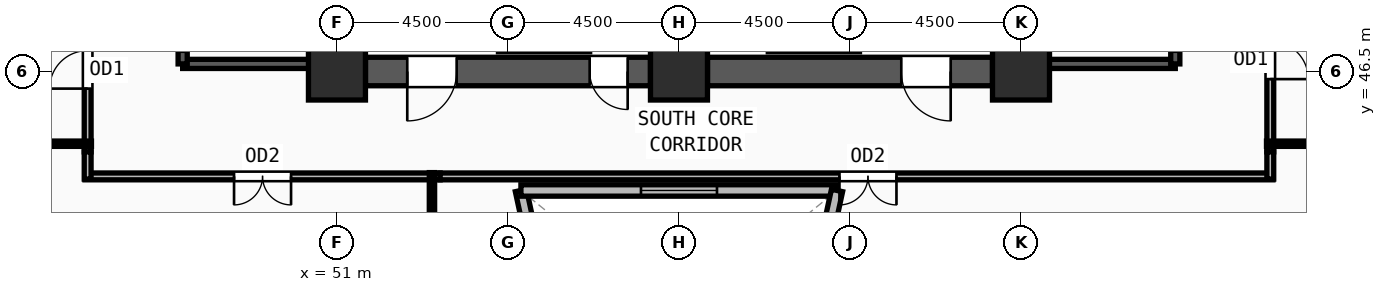
"""IFC4 building model, lengths in metres.
Left out: names, types, materials, properties, quantities, classifications, styles, units other than length and angle.
Written with IfcOpenShell. Run it as: python <this file> out.ifc"""

import sys

from ifc_helpers import new_model, si_unit, direction, frame, frame_2d, origin, origin_2d, place, context, subcontext, project, spatial, rectangle, extrude, source, transform, mapped, element, fill, save


model = new_model("IFC4")
c1 = context("Model", 3, precision=1e-05, world=origin(), true_north=direction((0.0, 1.0)))
c2 = subcontext(c1, "Body", "Model", "MODEL_VIEW")
j1 = project(units=[si_unit("LENGTHUNIT", "METRE"), si_unit("PLANEANGLEUNIT", "RADIAN")], contexts=[c1])
p1 = place(None, origin())
s1 = spatial("IfcSite", under=j1, at=p1, CompositionType="ELEMENT")
p2 = place(p1, origin())
s2 = spatial("IfcBuilding", under=s1, at=p2, CompositionType="ELEMENT")
p3 = place(p2, frame((0.0, 0.0, 102.0)))
s3 = spatial("IfcBuildingStorey", under=s2, at=p3, CompositionType="ELEMENT", Elevation=102.0)
m1 = source(origin(), c2, "Body", "SweptSolid", [
    extrude(rectangle(XDim=1.5, YDim=1.5, at=origin_2d()), origin(), (0.0, 0.0, 1.0), 3.75),
])
for number, where, z_axis, x_axis in (
    (1, (51.0, 46.5, 0.0), (0.0, 0.0, 1.0), (1.0, 0.0, 0.0)),
    (2, (60.0, 46.5, 0.0), (0.0, 0.0, 1.0), (1.0, 0.0, 0.0)),
    (3, (69.0, 46.5, 0.0), (0.0, 0.0, 1.0), (1.0, 0.0, 0.0)),
):
    element("IfcColumn", number, at=place(p3, frame(where, z_axis=z_axis, x_axis=x_axis)), inside=s3, PredefinedType="COLUMN", context=c2, shape_type="MappedRepresentation", body=[
        mapped(m1, transform((0.0, 0.0, 0.0), x_axis=(1.0, 0.0, 0.0), y_axis=(0.0, 1.0, 0.0), z_axis=(0.0, 0.0, 1.0), scale=1.0)),
    ])
p4 = place(p3, frame((68.25, 46.5, 0.0), z_axis=(0.0, 0.0, 1.0), x_axis=(-1.0, 0.0, 0.0)))
e4 = element("IfcWall", 4, at=p4, inside=s3, PredefinedType="SHEAR", context=c2, shape_type="SweptSolid", body=[
    extrude(rectangle(XDim=7.5, YDim=0.75, at=frame_2d((3.75, 0.0))), origin(), (0.0, 0.0, 1.0), 3.57),
])
m2 = source(origin(), c2, "Body", "SweptSolid", [
    extrude(rectangle(XDim=1.3, YDim=2.2, at=frame_2d((0.65, 1.1))), frame((0.0, 0.385, 0.0), z_axis=(0.0, -1.0, 0.0), x_axis=(1.0, 0.0, 0.0)), (0.0, 0.0, 1.0), 0.77),
])
p5 = place(p4, frame((1.1, 0.0, 0.0)))
e5 = element("IfcOpeningElement", 5, at=p5, cuts=e4, PredefinedType="OPENING", context=c2, shape_type="MappedRepresentation", body=[
    mapped(m2, transform((0.0, 0.0, 0.0), x_axis=(1.0, 0.0, 0.0), y_axis=(0.0, 1.0, 0.0), z_axis=(0.0, 0.0, 1.0), scale=1.0)),
])
p6 = place(p3, frame((59.25, 46.5, 0.0), z_axis=(0.0, 0.0, 1.0), x_axis=(-1.0, 0.0, 0.0)))
e6 = element("IfcWall", 6, at=p6, inside=s3, PredefinedType="SHEAR", context=c2, shape_type="SweptSolid", body=[
    extrude(rectangle(XDim=7.5, YDim=0.75, at=frame_2d((3.75, 0.0))), origin(), (0.0, 0.0, 1.0), 3.57),
])
p7 = place(p6, frame((5.1, 0.0, 0.0)))
e7 = element("IfcOpeningElement", 7, at=p7, cuts=e6, PredefinedType="OPENING", context=c2, shape_type="MappedRepresentation", body=[
    mapped(m2, transform((0.0, 0.0, 0.0), x_axis=(1.0, 0.0, 0.0), y_axis=(0.0, 1.0, 0.0), z_axis=(0.0, 0.0, 1.0), scale=1.0)),
])
m3 = source(origin(), c2, "Body", "SweptSolid", [
    extrude(rectangle(XDim=1.0, YDim=2.2, at=frame_2d((0.5, 1.1))), frame((0.0, 0.385, 0.0), z_axis=(0.0, -1.0, 0.0), x_axis=(1.0, 0.0, 0.0)), (0.0, 0.0, 1.0), 0.77),
])
p8 = place(p6, frame((0.6, 0.0, 0.0)))
e8 = element("IfcOpeningElement", 8, at=p8, cuts=e6, PredefinedType="OPENING", context=c2, shape_type="MappedRepresentation", body=[
    mapped(m3, transform((0.0, 0.0, 0.0), x_axis=(1.0, 0.0, 0.0), y_axis=(0.0, 1.0, 0.0), z_axis=(0.0, 0.0, 1.0), scale=1.0)),
])
p9 = place(p3, frame((46.94, 46.7, 0.0), z_axis=(0.0, 0.0, 1.0), x_axis=(1.0, 0.0, 0.0)))
e9 = element("IfcWall", 9, at=p9, inside=s3, PredefinedType="SOLIDWALL", context=c2, shape_type="SweptSolid", body=[
    extrude(rectangle(XDim=3.44, YDim=0.24, at=frame_2d((1.72, 0.0))), origin(), (0.0, 0.0, 1.0), 3.57),
])
p10 = place(p3, frame((50.38, 46.7, 0.0), z_axis=(0.0, 0.0, 1.0), x_axis=(0.0, 1.0, 0.0)))
e10 = element("IfcWall", 10, at=p10, inside=s3, PredefinedType="SOLIDWALL", context=c2, shape_type="SweptSolid", body=[
    extrude(rectangle(XDim=7.82, YDim=0.24, at=frame_2d((3.91, 0.0))), origin(), (0.0, 0.0, 1.0), 3.57),
])
p11 = place(p3, frame((46.94, 54.52, 0.0), z_axis=(0.0, 0.0, 1.0), x_axis=(0.0, -1.0, 0.0)))
e11 = element("IfcWall", 11, at=p11, inside=s3, PredefinedType="SOLIDWALL", context=c2, shape_type="SweptSolid", body=[
    extrude(rectangle(XDim=7.82, YDim=0.24, at=frame_2d((3.91, 0.0))), origin(), (0.0, 0.0, 1.0), 3.57),
])
m4 = source(origin(), c2, "Body", "SweptSolid", [
    extrude(rectangle(XDim=1.2, YDim=2.2, at=frame_2d((0.6, 1.1))), frame((0.0, 0.13, 0.0), z_axis=(0.0, -1.0, 0.0), x_axis=(1.0, 0.0, 0.0)), (0.0, 0.0, 1.0), 0.26),
])
p12 = place(p11, frame((6.3, 0.0, 0.0)))
e12 = element("IfcOpeningElement", 12, at=p12, cuts=e11, PredefinedType="OPENING", context=c2, shape_type="MappedRepresentation", body=[
    mapped(m4, transform((0.0, 0.0, 0.0), x_axis=(1.0, 0.0, 0.0), y_axis=(0.0, 1.0, 0.0), z_axis=(0.0, 0.0, 1.0), scale=1.0)),
])
p13 = place(p3, frame((69.62, 46.7, 0.0), z_axis=(0.0, 0.0, 1.0), x_axis=(1.0, 0.0, 0.0)))
e13 = element("IfcWall", 13, at=p13, inside=s3, PredefinedType="SOLIDWALL", context=c2, shape_type="SweptSolid", body=[
    extrude(rectangle(XDim=3.44, YDim=0.24, at=frame_2d((1.72, 0.0))), origin(), (0.0, 0.0, 1.0), 3.57),
])
p14 = place(p3, frame((73.06, 46.7, 0.0), z_axis=(0.0, 0.0, 1.0), x_axis=(0.0, 1.0, 0.0)))
e14 = element("IfcWall", 14, at=p14, inside=s3, PredefinedType="SOLIDWALL", context=c2, shape_type="SweptSolid", body=[
    extrude(rectangle(XDim=7.82, YDim=0.24, at=frame_2d((3.91, 0.0))), origin(), (0.0, 0.0, 1.0), 3.57),
])
p15 = place(p14, frame((0.32, 0.0, 0.0)))
e15 = element("IfcOpeningElement", 15, at=p15, cuts=e14, PredefinedType="OPENING", context=c2, shape_type="MappedRepresentation", body=[
    mapped(m4, transform((0.0, 0.0, 0.0), x_axis=(1.0, 0.0, 0.0), y_axis=(0.0, 1.0, 0.0), z_axis=(0.0, 0.0, 1.0), scale=1.0)),
])
p16 = place(p3, frame((69.62, 54.52, 0.0), z_axis=(0.0, 0.0, 1.0), x_axis=(0.0, -1.0, 0.0)))
e16 = element("IfcWall", 16, at=p16, inside=s3, PredefinedType="SOLIDWALL", context=c2, shape_type="SweptSolid", body=[
    extrude(rectangle(XDim=7.82, YDim=0.24, at=frame_2d((3.91, 0.0))), origin(), (0.0, 0.0, 1.0), 3.57),
])
p17 = place(p3, frame((57.297, 36.638, 0.0), z_axis=(0.0, 0.0, 1.0), x_axis=(-0.211395025219, 0.977400707649, 0.0)))
e17 = element("IfcWall", 17, at=p17, inside=s3, PredefinedType="SOLIDWALL", context=c2, shape_type="SweptSolid", body=[
    extrude(rectangle(XDim=6.888, YDim=0.3, at=frame_2d((3.444, 0.0))), origin(), (0.0, 0.0, 1.0), 3.57),
])
m5 = source(origin(), c2, "Body", "SweptSolid", [
    extrude(rectangle(XDim=2.0, YDim=1.9, at=frame_2d((1.0, 0.95))), frame((0.0, 0.16, 0.0), z_axis=(0.0, -1.0, 0.0), x_axis=(1.0, 0.0, 0.0)), (0.0, 0.0, 1.0), 0.32),
])
p18 = place(p17, frame((2.444, 0.0, 0.55)))
e18 = element("IfcOpeningElement", 18, at=p18, cuts=e17, PredefinedType="OPENING", context=c2, shape_type="MappedRepresentation", body=[
    mapped(m5, transform((0.0, 0.0, 0.0), x_axis=(1.0, 0.0, 0.0), y_axis=(0.0, 1.0, 0.0), z_axis=(0.0, 0.0, 1.0), scale=1.0)),
])
p19 = place(p3, frame((55.841, 43.37, 0.0), z_axis=(0.0, 0.0, 1.0), x_axis=(1.0, 0.0, 0.0)))
e19 = element("IfcWall", 19, at=p19, inside=s3, PredefinedType="SOLIDWALL", context=c2, shape_type="SweptSolid", body=[
    extrude(rectangle(XDim=8.318, YDim=0.3, at=frame_2d((4.159, 0.0))), origin(), (0.0, 0.0, 1.0), 3.57),
])
p20 = place(p19, frame((3.159, 0.0, 0.55)))
e20 = element("IfcOpeningElement", 20, at=p20, cuts=e19, PredefinedType="OPENING", context=c2, shape_type="MappedRepresentation", body=[
    mapped(m5, transform((0.0, 0.0, 0.0), x_axis=(1.0, 0.0, 0.0), y_axis=(0.0, 1.0, 0.0), z_axis=(0.0, 0.0, 1.0), scale=1.0)),
])
p21 = place(p3, frame((64.159, 43.37, 0.0), z_axis=(0.0, 0.0, 1.0), x_axis=(-0.211395025219, -0.977400707649, 0.0)))
e21 = element("IfcWall", 21, at=p21, inside=s3, PredefinedType="SOLIDWALL", context=c2, shape_type="SweptSolid", body=[
    extrude(rectangle(XDim=6.888, YDim=0.3, at=frame_2d((3.444, 0.0))), origin(), (0.0, 0.0, 1.0), 3.57),
])
p22 = place(p21, frame((2.444, 0.0, 0.55)))
e22 = element("IfcOpeningElement", 22, at=p22, cuts=e21, PredefinedType="OPENING", context=c2, shape_type="MappedRepresentation", body=[
    mapped(m5, transform((0.0, 0.0, 0.0), x_axis=(1.0, 0.0, 0.0), y_axis=(0.0, 1.0, 0.0), z_axis=(0.0, 0.0, 1.0), scale=1.0)),
])
p23 = place(p3, frame((44.44, 44.385, 0.0), z_axis=(0.0, 0.0, 1.0), x_axis=(0.0, 1.0, 0.0)))
e23 = element("IfcWall", 23, at=p23, inside=s3, PredefinedType="PARTITIONING", context=c2, shape_type="SweptSolid", body=[
    extrude(rectangle(XDim=4.33, YDim=0.18, at=frame_2d((2.165, 0.0))), origin(), (0.0, 0.0, 1.0), 3.57),
])
m6 = source(origin(), c2, "Body", "SweptSolid", [
    extrude(rectangle(XDim=1.0, YDim=2.2, at=frame_2d((0.5, 1.1))), frame((0.0, 0.1, 0.0), z_axis=(0.0, -1.0, 0.0), x_axis=(1.0, 0.0, 0.0)), (0.0, 0.0, 1.0), 0.2),
])
p24 = place(p23, frame((1.665, 0.0, 0.0)))
e24 = element("IfcOpeningElement", 24, at=p24, cuts=e23, PredefinedType="OPENING", context=c2, shape_type="MappedRepresentation", body=[
    mapped(m6, transform((0.0, 0.0, 0.0), x_axis=(1.0, 0.0, 0.0), y_axis=(0.0, 1.0, 0.0), z_axis=(0.0, 0.0, 1.0), scale=1.0)),
])
p25 = place(p3, frame((53.715, 43.74, 0.0), z_axis=(0.0, 0.0, 1.0), x_axis=(-1.0, 0.0, 0.0)))
e25 = element("IfcWall", 25, at=p25, inside=s3, PredefinedType="PARTITIONING", context=c2, shape_type="SweptSolid", body=[
    extrude(rectangle(XDim=9.345, YDim=0.18, at=frame_2d((4.672, 0.0))), origin(), (0.0, 0.0, 1.0), 3.57),
])
m7 = source(origin(), c2, "Body", "SweptSolid", [
    extrude(rectangle(XDim=1.5, YDim=2.2, at=frame_2d((0.75, 1.1))), frame((0.0, 0.1, 0.0), z_axis=(0.0, -1.0, 0.0), x_axis=(1.0, 0.0, 0.0)), (0.0, 0.0, 1.0), 0.2),
])
p26 = place(p25, frame((3.923, 0.0, 0.0)))
e26 = element("IfcOpeningElement", 26, at=p26, cuts=e25, PredefinedType="OPENING", context=c2, shape_type="MappedRepresentation", body=[
    mapped(m7, transform((0.0, 0.0, 0.0), x_axis=(1.0, 0.0, 0.0), y_axis=(0.0, 1.0, 0.0), z_axis=(0.0, 0.0, 1.0), scale=1.0)),
])
p27 = place(p3, frame((75.63, 43.74, 0.0), z_axis=(0.0, 0.0, 1.0), x_axis=(-1.0, 0.0, 0.0)))
e27 = element("IfcWall", 27, at=p27, inside=s3, PredefinedType="PARTITIONING", context=c2, shape_type="SweptSolid", body=[
    extrude(rectangle(XDim=21.915, YDim=0.18, at=frame_2d((10.958, 0.0))), origin(), (0.0, 0.0, 1.0), 3.57),
])
p28 = place(p27, frame((9.907, 0.0, 0.0)))
e28 = element("IfcOpeningElement", 28, at=p28, cuts=e27, PredefinedType="OPENING", context=c2, shape_type="MappedRepresentation", body=[
    mapped(m7, transform((0.0, 0.0, 0.0), x_axis=(1.0, 0.0, 0.0), y_axis=(0.0, 1.0, 0.0), z_axis=(0.0, 0.0, 1.0), scale=1.0)),
])
p29 = place(p3, frame((75.56, 49.215, 0.0), z_axis=(0.0, 0.0, 1.0), x_axis=(0.0, -1.0, 0.0)))
e29 = element("IfcWall", 29, at=p29, inside=s3, PredefinedType="PARTITIONING", context=c2, shape_type="SweptSolid", body=[
    extrude(rectangle(XDim=4.83, YDim=0.18, at=frame_2d((2.415, 0.0))), origin(), (0.0, 0.0, 1.0), 3.57),
])
p30 = place(p29, frame((1.915, 0.0, 0.0)))
e30 = element("IfcOpeningElement", 30, at=p30, cuts=e29, PredefinedType="OPENING", context=c2, shape_type="MappedRepresentation", body=[
    mapped(m6, transform((0.0, 0.0, 0.0), x_axis=(1.0, 0.0, 0.0), y_axis=(0.0, 1.0, 0.0), z_axis=(0.0, 0.0, 1.0), scale=1.0)),
])
for number, where, z_axis, x_axis in (
    (31, (44.44, 43.67, 0.0), (0.0, 0.0, 1.0), (0.0, 1.0, 0.0)),
    (32, (75.56, 44.385, 0.0), (0.0, 0.0, 1.0), (0.0, -1.0, 0.0)),
):
    element("IfcWall", number, at=place(p3, frame(where, z_axis=z_axis, x_axis=x_axis)), inside=s3, PredefinedType="PARTITIONING", context=c2, shape_type="SweptSolid", body=[
        extrude(rectangle(XDim=0.715, YDim=0.18, at=frame_2d((0.357, 0.0))), origin(), (0.0, 0.0, 1.0), 3.57),
    ])
p31 = place(p3, frame((44.54, 44.6, 0.0), z_axis=(0.0, 0.0, 1.0), x_axis=(-1.0, 0.0, 0.0)))
e33 = element("IfcWall", 33, at=p31, inside=s3, PredefinedType="PARTITIONING", context=c2, shape_type="SweptSolid", body=[
    extrude(rectangle(XDim=10.168, YDim=0.14, at=frame_2d((5.084, 0.0))), origin(), (0.0, 0.0, 1.0), 3.57),
])
p32 = place(p3, frame((75.46, 44.6, 0.0), z_axis=(0.0, 0.0, 1.0), x_axis=(1.0, 0.0, 0.0)))
e34 = element("IfcWall", 34, at=p32, inside=s3, PredefinedType="PARTITIONING", context=c2, shape_type="SweptSolid", body=[
    extrude(rectangle(XDim=10.508, YDim=0.14, at=frame_2d((5.254, 0.0))), origin(), (0.0, 0.0, 1.0), 3.57),
])
p33 = place(p3, frame((53.5, 43.84, 0.0), z_axis=(0.0, 0.0, 1.0), x_axis=(0.0, -1.0, 0.0)))
e35 = element("IfcWall", 35, at=p33, inside=s3, PredefinedType="PARTITIONING", context=c2, shape_type="SweptSolid", body=[
    extrude(rectangle(XDim=29.343, YDim=0.14, at=frame_2d((14.671, 0.0))), origin(), (0.0, 0.0, 1.0), 2.755),
])
m8 = source(origin(), c2, "Body", "SweptSolid", [
    extrude(rectangle(XDim=1.3, YDim=2.2, at=frame_2d((0.65, 1.1))), frame((0.0, 0.025, 0.0), z_axis=(0.0, -1.0, 0.0), x_axis=(1.0, 0.0, 0.0)), (0.0, 0.0, 1.0), 0.05),
])
p34 = place(p7, origin())
e36 = element("IfcDoor", 36, at=p34, inside=s3, OperationType="SINGLE_SWING_RIGHT", PredefinedType="DOOR", context=c2, shape_type="MappedRepresentation", body=[
    mapped(m8, transform((0.0, 0.0, 0.0), x_axis=(1.0, 0.0, 0.0), y_axis=(0.0, 1.0, 0.0), z_axis=(0.0, 0.0, 1.0), scale=1.0)),
])
fill(e7, e36)
m9 = source(origin(), c2, "Body", "SweptSolid", [
    extrude(rectangle(XDim=1.0, YDim=2.2, at=frame_2d((0.5, 1.1))), frame((0.0, 0.025, 0.0), z_axis=(0.0, -1.0, 0.0), x_axis=(1.0, 0.0, 0.0)), (0.0, 0.0, 1.0), 0.05),
])
p35 = place(p8, origin())
e37 = element("IfcDoor", 37, at=p35, inside=s3, OperationType="SINGLE_SWING_LEFT", PredefinedType="DOOR", context=c2, shape_type="MappedRepresentation", body=[
    mapped(m9, transform((0.0, 0.0, 0.0), x_axis=(1.0, 0.0, 0.0), y_axis=(0.0, 1.0, 0.0), z_axis=(0.0, 0.0, 1.0), scale=1.0)),
])
fill(e8, e37)
p36 = place(p5, origin())
e38 = element("IfcDoor", 38, at=p36, inside=s3, OperationType="SINGLE_SWING_LEFT", PredefinedType="DOOR", context=c2, shape_type="MappedRepresentation", body=[
    mapped(m8, transform((0.0, 0.0, 0.0), x_axis=(1.0, 0.0, 0.0), y_axis=(0.0, 1.0, 0.0), z_axis=(0.0, 0.0, 1.0), scale=1.0)),
])
fill(e5, e38)
m10 = source(origin(), c2, "Body", "SweptSolid", [
    extrude(rectangle(XDim=2.0, YDim=1.9, at=frame_2d((1.0, 0.95))), frame((0.0, 0.03, 0.0), z_axis=(0.0, -1.0, 0.0), x_axis=(1.0, 0.0, 0.0)), (0.0, 0.0, 1.0), 0.06),
])
p37 = place(p20, origin())
e39 = element("IfcWindow", 39, at=p37, inside=s3, PartitioningType="DOUBLE_PANEL_VERTICAL", PredefinedType="WINDOW", context=c2, shape_type="MappedRepresentation", body=[
    mapped(m10, transform((0.0, 0.0, 0.0), x_axis=(1.0, 0.0, 0.0), y_axis=(0.0, 1.0, 0.0), z_axis=(0.0, 0.0, 1.0), scale=1.0)),
])
fill(e20, e39)
p38 = place(p24, origin())
e40 = element("IfcDoor", 40, at=p38, inside=s3, OperationType="SINGLE_SWING_LEFT", PredefinedType="DOOR", context=c2, shape_type="MappedRepresentation", body=[
    mapped(m9, transform((0.0, 0.0, 0.0), x_axis=(1.0, 0.0, 0.0), y_axis=(0.0, 1.0, 0.0), z_axis=(0.0, 0.0, 1.0), scale=1.0)),
])
fill(e24, e40)
m11 = source(origin(), c2, "Body", "SweptSolid", [
    extrude(rectangle(XDim=1.5, YDim=2.2, at=frame_2d((0.75, 1.1))), frame((0.0, 0.025, 0.0), z_axis=(0.0, -1.0, 0.0), x_axis=(1.0, 0.0, 0.0)), (0.0, 0.0, 1.0), 0.05),
])
p39 = place(p26, origin())
e41 = element("IfcDoor", 41, at=p39, inside=s3, OperationType="DOUBLE_DOOR_SINGLE_SWING", PredefinedType="DOOR", context=c2, shape_type="MappedRepresentation", body=[
    mapped(m11, transform((0.0, 0.0, 0.0), x_axis=(1.0, 0.0, 0.0), y_axis=(0.0, 1.0, 0.0), z_axis=(0.0, 0.0, 1.0), scale=1.0)),
])
fill(e26, e41)
p40 = place(p28, origin())
e42 = element("IfcDoor", 42, at=p40, inside=s3, OperationType="DOUBLE_DOOR_SINGLE_SWING", PredefinedType="DOOR", context=c2, shape_type="MappedRepresentation", body=[
    mapped(m11, transform((0.0, 0.0, 0.0), x_axis=(1.0, 0.0, 0.0), y_axis=(0.0, 1.0, 0.0), z_axis=(0.0, 0.0, 1.0), scale=1.0)),
])
fill(e28, e42)
p41 = place(p30, origin())
e43 = element("IfcDoor", 43, at=p41, inside=s3, OperationType="SINGLE_SWING_RIGHT", PredefinedType="DOOR", context=c2, shape_type="MappedRepresentation", body=[
    mapped(m9, transform((0.0, 0.0, 0.0), x_axis=(1.0, 0.0, 0.0), y_axis=(0.0, 1.0, 0.0), z_axis=(0.0, 0.0, 1.0), scale=1.0)),
])
fill(e30, e43)
save(model, sys.argv[1])
